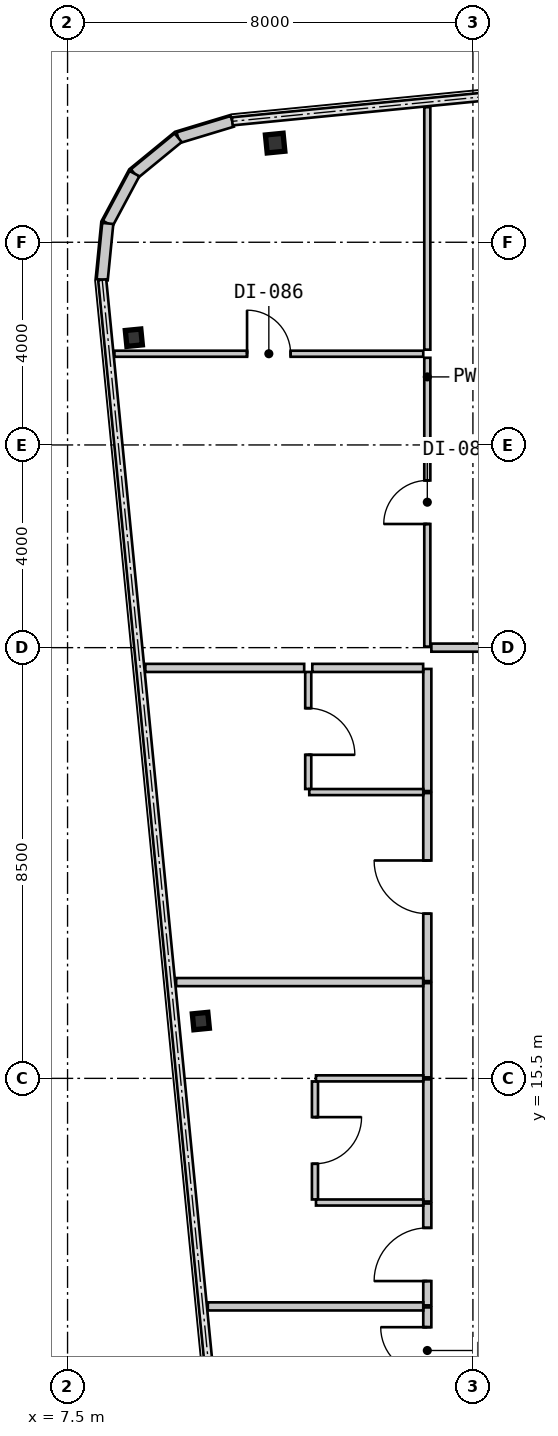
"""IFC4 building model, lengths in metres.
Left out: names, types, materials, properties, quantities, classifications, styles, units other than length and angle.
Written with IfcOpenShell. Run it as: python <this file> out.ifc"""

import sys

from ifc_helpers import new_model, si_unit, direction, frame, frame_2d, origin, origin_2d, place, context, subcontext, project, spatial, rectangle, i_section, extrude, source, transform, mapped, element, fill, save


model = new_model("IFC4")
c1 = context("Model", 3, precision=1e-05, world=origin(), true_north=direction((0.0, 1.0)))
c2 = subcontext(c1, "Body", "Model", "MODEL_VIEW")
j1 = project(units=[si_unit("LENGTHUNIT", "METRE"), si_unit("PLANEANGLEUNIT", "RADIAN")], contexts=[c1])
p1 = place(None, origin())
s1 = spatial("IfcSite", under=j1, at=p1, CompositionType="ELEMENT")
p2 = place(p1, origin())
s2 = spatial("IfcBuilding", under=s1, at=p2, CompositionType="ELEMENT")
p3 = place(p2, frame((0.0, 0.0, 80.85)))
s3 = spatial("IfcBuildingStorey", under=s2, at=p3, CompositionType="ELEMENT", Elevation=80.85)
m1 = source(origin(), c2, "Body", "SweptSolid", [
    extrude(i_section(OverallWidth=0.35, OverallDepth=0.356, WebThickness=0.018, FlangeThickness=0.028, at=origin_2d()), origin(), (0.0, 0.0, 1.0), 3.15),
])
p4 = place(p3, frame((11.597, 33.957, 0.0), z_axis=(0.0, 0.0, 1.0), x_axis=(0.995227399982, 0.097582899759, 0.0)))
e1 = element("IfcColumn", 1, at=p4, inside=s3, PredefinedType="COLUMN", context=c2, shape_type="MappedRepresentation", body=[
    mapped(m1, transform((0.0, 0.0, 0.0), scale=1.0)),
])
m2 = source(origin(), c2, "Body", "SweptSolid", [
    extrude(i_section(OverallWidth=0.307, OverallDepth=0.315, WebThickness=0.012, FlangeThickness=0.019, at=origin_2d()), origin(), (0.0, 0.0, 1.0), 3.15),
])
for number, where, z_axis, x_axis in (
    (2, (10.131, 16.631, 0.0), (0.0, 0.0, 1.0), (0.995, 0.098, 0.0)),
    (3, (8.808, 30.116, 0.0), (0.0, 0.0, 1.0), (0.995, 0.098, 0.0)),
):
    element("IfcColumn", number, at=place(p3, frame(where, z_axis=z_axis, x_axis=x_axis)), inside=s3, PredefinedType="COLUMN", context=c2, shape_type="MappedRepresentation", body=[
        mapped(m2, transform((0.0, 0.0, 0.0), scale=1.0)),
    ])
m3 = source(origin(), c2, "Body", "SweptSolid", [
    extrude(rectangle(XDim=1.116, YDim=0.22, at=frame_2d((0.558, 0.0))), origin(), (0.0, 0.0, 1.0), 2.93),
])
p5 = place(p3, frame((10.751, 34.386, 0.0), z_axis=(0.0, 0.0, 1.0), x_axis=(-0.957070388811, -0.289855603468, 0.0)))
e4 = element("IfcWall", 4, at=p5, inside=s3, PredefinedType="SOLIDWALL", context=c2, shape_type="MappedRepresentation", body=[
    mapped(m3, transform((0.0, 0.0, 0.0), scale=1.0)),
])
m4 = source(origin(), c2, "Body", "SweptSolid", [
    extrude(rectangle(XDim=1.116, YDim=0.22, at=frame_2d((0.558, 0.0))), origin(), (0.0, 0.0, 1.0), 2.93),
])
p6 = place(p3, frame((9.683, 34.063, 0.0), z_axis=(0.0, 0.0, 1.0), x_axis=(-0.773254916409, -0.634095287989, 0.0)))
e5 = element("IfcWall", 5, at=p6, inside=s3, PredefinedType="SOLIDWALL", context=c2, shape_type="MappedRepresentation", body=[
    mapped(m4, transform((0.0, 0.0, 0.0), scale=1.0)),
])
m5 = source(origin(), c2, "Body", "SweptSolid", [
    extrude(rectangle(XDim=1.116, YDim=0.22, at=frame_2d((0.558, 0.0))), origin(), (0.0, 0.0, 1.0), 2.93),
])
p7 = place(p3, frame((8.82, 33.355, 0.0), z_axis=(0.0, 0.0, 1.0), x_axis=(-0.471802540493, -0.881704237704, 0.0)))
e6 = element("IfcWall", 6, at=p7, inside=s3, PredefinedType="SOLIDWALL", context=c2, shape_type="MappedRepresentation", body=[
    mapped(m5, transform((0.0, 0.0, 0.0), scale=1.0)),
])
p8 = place(p3, frame((8.293, 32.371, 0.0), z_axis=(0.0, 0.0, 1.0), x_axis=(-0.098463783145, -0.99514063499, 0.0)))
e7 = element("IfcWall", 7, at=p8, inside=s3, PredefinedType="SOLIDWALL", context=c2, shape_type="MappedRepresentation", body=[
    mapped(m4, transform((0.0, 0.0, 0.0), scale=1.0)),
])
m6 = source(origin(), c2, "Body", "SweptSolid", [
    extrude(rectangle(XDim=1.7, YDim=0.16, at=frame_2d((0.85, 0.0))), origin(), (0.0, 0.0, 1.0), 2.623),
])
p9 = place(p3, frame((14.6, 9.28, 0.0), z_axis=(0.0, 0.0, 1.0), x_axis=(0.0, 1.0, 0.0)))
e8 = element("IfcWall", 8, at=p9, inside=s3, PredefinedType="PARTITIONING", context=c2, shape_type="MappedRepresentation", body=[
    mapped(m6, transform((0.0, 0.0, 0.0), scale=1.0)),
])
m7 = source(origin(), c2, "Body", "SweptSolid", [
    extrude(rectangle(XDim=0.92, YDim=2.1, at=frame_2d((0.46, 1.05))), frame((0.0, 0.09, 0.0), z_axis=(0.0, -1.0, 0.0), x_axis=(1.0, 0.0, 0.0)), (0.0, 0.0, 1.0), 0.18),
])
p10 = place(p9, frame((0.39, 0.0, 0.0)))
e9 = element("IfcOpeningElement", 9, at=p10, cuts=e8, PredefinedType="OPENING", context=c2, shape_type="MappedRepresentation", body=[
    mapped(m7, transform((0.0, 0.0, 0.0), scale=1.0)),
])
m8 = source(origin(), c2, "Body", "SweptSolid", [
    extrude(rectangle(XDim=2.01, YDim=0.16, at=frame_2d((1.005, 0.0))), origin(), (0.0, 0.0, 1.0), 2.93),
])
p11 = place(p3, frame((14.6, 11.02, 0.0), z_axis=(0.0, 0.0, 1.0), x_axis=(0.0, 1.0, 0.0)))
e10 = element("IfcWall", 10, at=p11, inside=s3, PredefinedType="PARTITIONING", context=c2, shape_type="MappedRepresentation", body=[
    mapped(m8, transform((0.0, 0.0, 0.0), scale=1.0)),
])
m9 = source(origin(), c2, "Body", "SweptSolid", [
    extrude(rectangle(XDim=1.05, YDim=2.1, at=frame_2d((0.525, 1.05))), frame((0.0, 0.09, 0.0), z_axis=(0.0, -1.0, 0.0), x_axis=(1.0, 0.0, 0.0)), (0.0, 0.0, 1.0), 0.18),
])
p12 = place(p11, frame((0.48, 0.0, 0.0)))
e11 = element("IfcOpeningElement", 11, at=p12, cuts=e10, PredefinedType="OPENING", context=c2, shape_type="MappedRepresentation", body=[
    mapped(m9, transform((0.0, 0.0, 0.0), scale=1.0)),
])
m10 = source(origin(), c2, "Body", "SweptSolid", [
    extrude(rectangle(XDim=1.859, YDim=0.16, at=frame_2d((0.93, 0.0))), origin(), (0.0, 0.0, 1.0), 2.93),
])
p13 = place(p3, frame((14.6, 15.52, 0.0), z_axis=(0.0, 0.0, 1.0), x_axis=(0.0, 1.0, 0.0)))
e12 = element("IfcWall", 12, at=p13, inside=s3, PredefinedType="PARTITIONING", context=c2, shape_type="MappedRepresentation", body=[
    mapped(m10, transform((0.0, 0.0, 0.0), scale=1.0)),
])
m11 = source(origin(), c2, "Body", "SweptSolid", [
    extrude(rectangle(XDim=2.409, YDim=0.16, at=frame_2d((1.205, 0.0))), origin(), (0.0, 0.0, 1.0), 2.93),
])
p14 = place(p3, frame((14.6, 13.07, 0.0), z_axis=(0.0, 0.0, 1.0), x_axis=(0.0, 1.0, 0.0)))
e13 = element("IfcWall", 13, at=p14, inside=s3, PredefinedType="PARTITIONING", context=c2, shape_type="MappedRepresentation", body=[
    mapped(m11, transform((0.0, 0.0, 0.0), scale=1.0)),
])
m12 = source(origin(), c2, "Body", "SweptSolid", [
    extrude(rectangle(XDim=3.709, YDim=0.16, at=frame_2d((1.855, 0.0))), origin(), (0.0, 0.0, 1.0), 2.93),
])
p15 = place(p3, frame((14.6, 17.42, 0.0), z_axis=(0.0, 0.0, 1.0), x_axis=(0.0, 1.0, 0.0)))
e14 = element("IfcWall", 14, at=p15, inside=s3, PredefinedType="PARTITIONING", context=c2, shape_type="MappedRepresentation", body=[
    mapped(m12, transform((0.0, 0.0, 0.0), scale=1.0)),
])
p16 = place(p15, frame((1.33, 0.0, 0.0)))
e15 = element("IfcOpeningElement", 15, at=p16, cuts=e14, PredefinedType="OPENING", context=c2, shape_type="MappedRepresentation", body=[
    mapped(m9, transform((0.0, 0.0, 0.0), scale=1.0)),
])
p17 = place(p3, frame((14.6, 21.17, 0.0), z_axis=(0.0, 0.0, 1.0), x_axis=(0.0, 1.0, 0.0)))
e16 = element("IfcWall", 16, at=p17, inside=s3, PredefinedType="PARTITIONING", context=c2, shape_type="MappedRepresentation", body=[
    mapped(m11, transform((0.0, 0.0, 0.0), scale=1.0)),
])
m13 = source(origin(), c2, "Body", "SweptSolid", [
    extrude(rectangle(XDim=4.17, YDim=0.16, at=frame_2d((2.085, 0.0))), origin(), (0.0, 0.0, 1.0), 2.93),
])
p18 = place(p3, frame((14.68, 24.0, 0.0), z_axis=(0.0, 0.0, 1.0), x_axis=(1.0, 0.0, 0.0)))
e17 = element("IfcWall", 17, at=p18, inside=s3, PredefinedType="PARTITIONING", context=c2, shape_type="MappedRepresentation", body=[
    mapped(m13, transform((0.0, 0.0, 0.0), scale=1.0)),
])
p19 = place(p18, frame((1.69, 0.0, 0.0)))
e18 = element("IfcOpeningElement", 18, at=p19, cuts=e17, PredefinedType="OPENING", context=c2, shape_type="MappedRepresentation", body=[
    mapped(m7, transform((0.0, 0.0, 0.0), scale=1.0)),
])
m14 = source(origin(), c2, "Body", "SweptSolid", [
    extrude(rectangle(XDim=4.251, YDim=0.16, at=frame_2d((2.126, 0.0))), origin(), (0.0, 0.0, 1.0), 2.93),
])
p20 = place(p3, frame((10.269, 11.0, 0.0), z_axis=(0.0, 0.0, 1.0), x_axis=(1.0, 0.0, 0.0)))
e19 = element("IfcWall", 19, at=p20, inside=s3, PredefinedType="PARTITIONING", context=c2, shape_type="MappedRepresentation", body=[
    mapped(m14, transform((0.0, 0.0, 0.0), scale=1.0)),
])
m15 = source(origin(), c2, "Body", "SweptSolid", [
    extrude(rectangle(XDim=2.33, YDim=0.12, at=frame_2d((1.165, 0.0))), origin(), (0.0, 0.0, 1.0), 2.93),
])
p21 = place(p3, frame((12.383, 15.44, 0.0), z_axis=(0.0, 0.0, 1.0), x_axis=(0.0, -1.0, 0.0)))
e20 = element("IfcWall", 20, at=p21, inside=s3, PredefinedType="PARTITIONING", context=c2, shape_type="MappedRepresentation", body=[
    mapped(m15, transform((0.0, 0.0, 0.0), scale=1.0)),
])
m16 = source(origin(), c2, "Body", "SweptSolid", [
    extrude(rectangle(XDim=0.92, YDim=2.1, at=frame_2d((0.46, 1.05))), frame((0.0, 0.07, 0.0), z_axis=(0.0, -1.0, 0.0), x_axis=(1.0, 0.0, 0.0)), (0.0, 0.0, 1.0), 0.14),
])
p22 = place(p21, frame((0.705, 0.0, 0.0)))
e21 = element("IfcOpeningElement", 21, at=p22, cuts=e20, PredefinedType="OPENING", context=c2, shape_type="MappedRepresentation", body=[
    mapped(m16, transform((0.0, 0.0, 0.0), scale=1.0)),
])
m17 = source(origin(), c2, "Body", "SweptSolid", [
    extrude(rectangle(XDim=2.117, YDim=0.12, at=frame_2d((1.059, 0.0))), origin(), (0.0, 0.0, 1.0), 2.93),
])
for number, where, z_axis, x_axis in (
    (22, (12.403, 13.05, 0.0), (0.0, 0.0, 1.0), (1.0, 0.0, 0.0)),
    (23, (14.52, 15.5, 0.0), (0.0, 0.0, 1.0), (-1.0, 0.0, 0.0)),
):
    element("IfcWall", number, at=place(p3, frame(where, z_axis=z_axis, x_axis=x_axis)), inside=s3, PredefinedType="PARTITIONING", context=c2, shape_type="MappedRepresentation", body=[
        mapped(m17, transform((0.0, 0.0, 0.0), scale=1.0)),
    ])
m18 = source(origin(), c2, "Body", "SweptSolid", [
    extrude(rectangle(XDim=4.875, YDim=0.16, at=frame_2d((2.438, 0.0))), origin(), (0.0, 0.0, 1.0), 2.93),
])
p23 = place(p3, frame((9.643, 17.4, 0.0), z_axis=(0.0, 0.0, 1.0), x_axis=(1.0, 0.0, 0.0)))
e24 = element("IfcWall", 24, at=p23, inside=s3, PredefinedType="PARTITIONING", context=c2, shape_type="MappedRepresentation", body=[
    mapped(m18, transform((0.0, 0.0, 0.0), scale=1.0)),
])
m19 = source(origin(), c2, "Body", "SweptSolid", [
    extrude(rectangle(XDim=2.31, YDim=0.12, at=frame_2d((1.155, 0.0))), origin(), (0.0, 0.0, 1.0), 2.93),
])
p24 = place(p3, frame((12.25, 23.52, 0.0), z_axis=(0.0, 0.0, 1.0), x_axis=(0.0, -1.0, 0.0)))
e25 = element("IfcWall", 25, at=p24, inside=s3, PredefinedType="PARTITIONING", context=c2, shape_type="MappedRepresentation", body=[
    mapped(m19, transform((0.0, 0.0, 0.0), scale=1.0)),
])
p25 = place(p24, frame((0.715, 0.0, 0.0)))
e26 = element("IfcOpeningElement", 26, at=p25, cuts=e25, PredefinedType="OPENING", context=c2, shape_type="MappedRepresentation", body=[
    mapped(m16, transform((0.0, 0.0, 0.0), scale=1.0)),
])
m20 = source(origin(), c2, "Body", "SweptSolid", [
    extrude(rectangle(XDim=2.25, YDim=0.12, at=frame_2d((1.125, 0.0))), origin(), (0.0, 0.0, 1.0), 2.93),
])
p26 = place(p3, frame((12.27, 21.15, 0.0), z_axis=(0.0, 0.0, 1.0), x_axis=(1.0, 0.0, 0.0)))
e27 = element("IfcWall", 27, at=p26, inside=s3, PredefinedType="PARTITIONING", context=c2, shape_type="MappedRepresentation", body=[
    mapped(m20, transform((0.0, 0.0, 0.0), scale=1.0)),
])
m21 = source(origin(), c2, "Body", "SweptSolid", [
    extrude(rectangle(XDim=3.135, YDim=0.16, at=frame_2d((1.567, 0.0))), origin(), (0.0, 0.0, 1.0), 2.93),
])
p27 = place(p3, frame((9.035, 23.6, 0.0), z_axis=(0.0, 0.0, 1.0), x_axis=(1.0, 0.0, 0.0)))
e28 = element("IfcWall", 28, at=p27, inside=s3, PredefinedType="PARTITIONING", context=c2, shape_type="MappedRepresentation", body=[
    mapped(m21, transform((0.0, 0.0, 0.0), scale=1.0)),
])
m22 = source(origin(), c2, "Body", "SweptSolid", [
    extrude(rectangle(XDim=2.188, YDim=0.16, at=frame_2d((1.094, 0.0))), origin(), (0.0, 0.0, 1.0), 2.93),
])
p28 = place(p3, frame((12.33, 23.6, 0.0), z_axis=(0.0, 0.0, 1.0), x_axis=(1.0, 0.0, 0.0)))
e29 = element("IfcWall", 29, at=p28, inside=s3, PredefinedType="PARTITIONING", context=c2, shape_type="MappedRepresentation", body=[
    mapped(m22, transform((0.0, 0.0, 0.0), scale=1.0)),
])
m23 = source(origin(), c2, "Body", "SweptSolid", [
    extrude(rectangle(XDim=6.095, YDim=0.12, at=frame_2d((3.047, 0.0))), origin(), (0.0, 0.0, 1.0), 2.93),
])
p29 = place(p3, frame((8.425, 29.8, 0.0), z_axis=(0.0, 0.0, 1.0), x_axis=(1.0, 0.0, 0.0)))
e30 = element("IfcWall", 30, at=p29, inside=s3, PredefinedType="PARTITIONING", context=c2, shape_type="MappedRepresentation", body=[
    mapped(m23, transform((0.0, 0.0, 0.0), scale=1.0)),
])
m24 = source(origin(), c2, "Body", "SweptSolid", [
    extrude(rectangle(XDim=0.86, YDim=2.1, at=frame_2d((0.43, 1.05))), frame((0.0, 0.07, 0.0), z_axis=(0.0, -1.0, 0.0), x_axis=(1.0, 0.0, 0.0)), (0.0, 0.0, 1.0), 0.14),
])
p30 = place(p29, frame((2.617, 0.0, 0.0)))
e31 = element("IfcOpeningElement", 31, at=p30, cuts=e30, PredefinedType="OPENING", context=c2, shape_type="MappedRepresentation", body=[
    mapped(m24, transform((0.0, 0.0, 0.0), scale=1.0)),
])
m25 = source(origin(), c2, "Body", "SweptSolid", [
    extrude(rectangle(XDim=5.7, YDim=0.12, at=frame_2d((2.85, 0.0))), origin(), (0.0, 0.0, 1.0), 2.93),
])
p31 = place(p3, frame((14.6, 29.72, 0.0), z_axis=(0.0, 0.0, 1.0), x_axis=(0.0, -1.0, 0.0)))
e32 = element("IfcWall", 32, at=p31, inside=s3, PredefinedType="PARTITIONING", context=c2, shape_type="MappedRepresentation", body=[
    mapped(m25, transform((0.0, 0.0, 0.0), scale=1.0)),
])
p32 = place(p31, frame((2.42, 0.0, 0.0)))
e33 = element("IfcOpeningElement", 33, at=p32, cuts=e32, PredefinedType="OPENING", context=c2, shape_type="MappedRepresentation", body=[
    mapped(m24, transform((0.0, 0.0, 0.0), scale=1.0)),
])
m26 = source(origin(), c2, "Body", "SweptSolid", [
    extrude(rectangle(XDim=4.786, YDim=0.12, at=frame_2d((2.393, 0.0))), origin(), (0.0, 0.0, 1.0), 2.93),
])
p33 = place(p3, frame((14.6, 34.666, 0.0), z_axis=(0.0, 0.0, 1.0), x_axis=(0.0, -1.0, 0.0)))
e34 = element("IfcWall", 34, at=p33, inside=s3, PredefinedType="PARTITIONING", context=c2, shape_type="MappedRepresentation", body=[
    mapped(m26, transform((0.0, 0.0, 0.0), scale=1.0)),
])
m27 = source(origin(), c2, "Body", "SweptSolid", [
    extrude(rectangle(XDim=0.92, YDim=2.1, at=frame_2d((0.46, 1.05))), frame((0.0, 0.025, 0.0), z_axis=(0.0, -1.0, 0.0), x_axis=(1.0, 0.0, 0.0)), (0.0, 0.0, 1.0), 0.05),
])
p34 = place(p10, origin())
e35 = element("IfcDoor", 35, at=p34, inside=s3, OperationType="SINGLE_SWING_RIGHT", PredefinedType="DOOR", context=c2, shape_type="MappedRepresentation", body=[
    mapped(m27, transform((0.0, 0.0, 0.0), scale=1.0)),
])
fill(e9, e35)
m28 = source(origin(), c2, "Body", "SweptSolid", [
    extrude(rectangle(XDim=1.05, YDim=2.1, at=frame_2d((0.525, 1.05))), frame((0.0, 0.025, 0.0), z_axis=(0.0, -1.0, 0.0), x_axis=(1.0, 0.0, 0.0)), (0.0, 0.0, 1.0), 0.05),
])
p35 = place(p12, origin())
e36 = element("IfcDoor", 36, at=p35, inside=s3, OperationType="SINGLE_SWING_LEFT", PredefinedType="DOOR", context=c2, shape_type="MappedRepresentation", body=[
    mapped(m28, transform((0.0, 0.0, 0.0), scale=1.0)),
])
fill(e11, e36)
p36 = place(p16, origin())
e37 = element("IfcDoor", 37, at=p36, inside=s3, OperationType="SINGLE_SWING_RIGHT", PredefinedType="DOOR", context=c2, shape_type="MappedRepresentation", body=[
    mapped(m28, transform((0.0, 0.0, 0.0), scale=1.0)),
])
fill(e15, e37)
p37 = place(p22, origin())
e38 = element("IfcDoor", 38, at=p37, inside=s3, OperationType="SINGLE_SWING_LEFT", PredefinedType="DOOR", context=c2, shape_type="MappedRepresentation", body=[
    mapped(m27, transform((0.0, 0.0, 0.0), scale=1.0)),
])
fill(e21, e38)
p38 = place(p25, origin())
e39 = element("IfcDoor", 39, at=p38, inside=s3, OperationType="SINGLE_SWING_RIGHT", PredefinedType="DOOR", context=c2, shape_type="MappedRepresentation", body=[
    mapped(m27, transform((0.0, 0.0, 0.0), scale=1.0)),
])
fill(e26, e39)
m29 = source(origin(), c2, "Body", "SweptSolid", [
    extrude(rectangle(XDim=0.86, YDim=2.1, at=frame_2d((0.43, 1.05))), frame((0.0, 0.025, 0.0), z_axis=(0.0, -1.0, 0.0), x_axis=(1.0, 0.0, 0.0)), (0.0, 0.0, 1.0), 0.05),
])
p39 = place(p32, frame((0.86, 0.0, 0.0), z_axis=(0.0, 0.0, 1.0), x_axis=(-1.0, 0.0, 0.0)))
e40 = element("IfcDoor", 40, at=p39, inside=s3, OperationType="SINGLE_SWING_LEFT", PredefinedType="DOOR", context=c2, shape_type="MappedRepresentation", body=[
    mapped(m29, transform((0.0, 0.0, 0.0), scale=1.0)),
])
fill(e33, e40)
p40 = place(p30, origin())
e41 = element("IfcDoor", 41, at=p40, inside=s3, OperationType="SINGLE_SWING_LEFT", PredefinedType="DOOR", context=c2, shape_type="MappedRepresentation", body=[
    mapped(m29, transform((0.0, 0.0, 0.0), scale=1.0)),
])
fill(e31, e41)
save(model, sys.argv[1])
